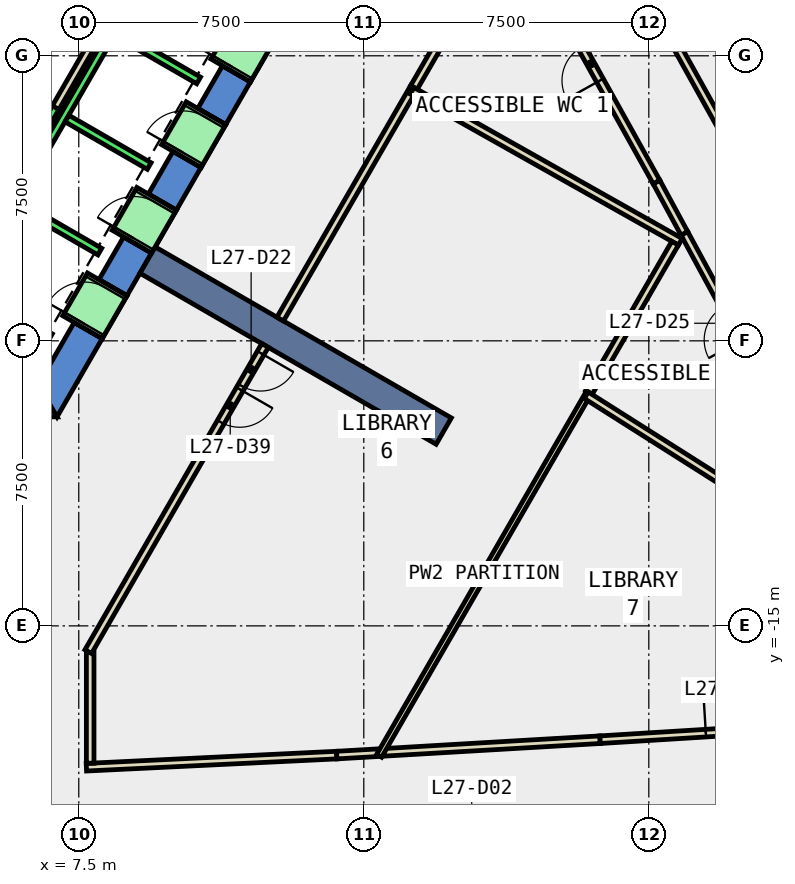
"""IFC4 building model, lengths in metres.
Left out: names, types, materials, properties, quantities, classifications, styles, units other than length and angle.
Written with IfcOpenShell. Run it as: python <this file> out.ifc"""

import sys

from ifc_helpers import new_model, si_unit, direction, frame, frame_2d, origin, place, context, subcontext, project, spatial, polyline, rectangle, outline, extrude, element, fill, save


model = new_model("IFC4")
c1 = context("Model", 3, precision=1e-05, world=origin(), true_north=direction((0.0, 1.0)))
c2 = subcontext(c1, "Body", "Model", "MODEL_VIEW")
j1 = project(units=[si_unit("LENGTHUNIT", "METRE"), si_unit("PLANEANGLEUNIT", "RADIAN")], contexts=[c1])
p1 = place(None, origin())
s1 = spatial("IfcSite", under=j1, at=p1, CompositionType="ELEMENT")
p2 = place(p1, origin())
s2 = spatial("IfcBuilding", under=s1, at=p2, CompositionType="ELEMENT")
p3 = place(p2, frame((0.0, 0.0, 124.4)))
s3 = spatial("IfcBuildingStorey", under=s2, at=p3, CompositionType="ELEMENT", Elevation=124.4)
p4 = place(p3, frame((0.0, 0.0, -0.4)))
e1 = element("IfcWall", 1, at=p4, inside=s3, PredefinedType="SHEAR", context=c2, shape_type="SweptSolid", body=[
    extrude(outline(polyline([(5.75, -8.65), (5.75, -9.5), (6.928, -9.5), (6.437, -8.65), (5.75, -8.65)])), origin(), (0.0, 0.0, 1.0), 4.2),
])
p5 = place(p3, frame((0.0, 0.0, -0.4)))
e2 = element("IfcWall", 2, at=p5, inside=s3, PredefinedType="SHEAR", context=c2, shape_type="SweptSolid", body=[
    extrude(outline(polyline([(8.117, -7.44), (7.381, -7.015), (6.437, -8.65), (6.928, -9.5), (8.117, -7.44)])), origin(), (0.0, 0.0, 1.0), 4.2),
])
p6 = place(p3, frame((0.0, 0.0, -0.4)))
e3 = element("IfcWall", 3, at=p6, inside=s3, PredefinedType="SHEAR", context=c2, shape_type="SweptSolid", body=[
    extrude(outline(polyline([(9.417, -5.189), (8.681, -4.764), (8.031, -5.889), (8.767, -6.314), (9.417, -5.189)])), origin(), (0.0, 0.0, 1.0), 4.2),
])
p7 = place(p3, frame((0.0, 0.0, -0.4)))
e4 = element("IfcWall", 4, at=p7, inside=s3, PredefinedType="SHEAR", context=c2, shape_type="SweptSolid", body=[
    extrude(outline(polyline([(10.717, -2.937), (9.981, -2.512), (9.331, -3.638), (10.067, -4.063), (10.717, -2.937)])), origin(), (0.0, 0.0, 1.0), 4.2),
])
p8 = place(p3, frame((0.0, 0.0, -0.4)))
e5 = element("IfcWall", 5, at=p8, inside=s3, PredefinedType="SHEAR", context=c2, shape_type="SweptSolid", body=[
    extrude(outline(polyline([(12.017, -0.686), (11.281, -0.261), (10.631, -1.386), (11.367, -1.811), (12.017, -0.686)])), origin(), (0.0, 0.0, 1.0), 4.2),
])
p9 = place(p3, frame((0.0, 0.0, 3.6)))
e6 = element("IfcWall", 6, at=p9, inside=s3, PredefinedType="SHEAR", context=c2, shape_type="SweptSolid", body=[
    extrude(outline(polyline([(8.767, -6.314), (8.031, -5.889), (7.381, -7.015), (8.117, -7.44), (8.767, -6.314)])), origin(), (0.0, 0.0, 1.0), 0.2),
])
p10 = place(p3, frame((0.0, 0.0, 3.6)))
e7 = element("IfcWall", 7, at=p10, inside=s3, PredefinedType="SHEAR", context=c2, shape_type="SweptSolid", body=[
    extrude(outline(polyline([(10.067, -4.063), (9.331, -3.638), (8.681, -4.764), (9.417, -5.189), (10.067, -4.063)])), origin(), (0.0, 0.0, 1.0), 0.2),
])
p11 = place(p3, frame((0.0, 0.0, 3.6)))
e8 = element("IfcWall", 8, at=p11, inside=s3, PredefinedType="SHEAR", context=c2, shape_type="SweptSolid", body=[
    extrude(outline(polyline([(11.367, -1.811), (10.631, -1.386), (9.981, -2.512), (10.717, -2.937), (11.367, -1.811)])), origin(), (0.0, 0.0, 1.0), 0.2),
])
p12 = place(p3, frame((0.0, 0.0, 3.6)))
e9 = element("IfcWall", 9, at=p12, inside=s3, PredefinedType="SHEAR", context=c2, shape_type="SweptSolid", body=[
    extrude(outline(polyline([(12.667, 0.44), (11.931, 0.865), (11.281, -0.261), (12.017, -0.686), (12.667, 0.44)])), origin(), (0.0, 0.0, 1.0), 0.2),
])
p13 = place(p3, frame((9.31, -5.375, -0.4), z_axis=(0.0, 0.0, 1.0), x_axis=(0.866017533419, -0.500013631625, 0.0)))
e10 = element("IfcWall", 10, at=p13, inside=s3, PredefinedType="SHEAR", context=c2, shape_type="SweptSolid", body=[
    extrude(rectangle(XDim=9.0, YDim=0.8, at=frame_2d((4.5, 0.0))), origin(), (0.0, 0.0, 1.0), 4.2),
])
p14 = place(p3, frame((7.7, -18.719, 0.0), z_axis=(0.0, 0.0, 1.0), x_axis=(0.998829118209, 0.048377604502, 0.0)))
e11 = element("IfcWall", 11, at=p14, inside=s3, PredefinedType="PARTITIONING", context=c2, shape_type="SweptSolid", body=[
    extrude(rectangle(XDim=6.596, YDim=0.2, at=frame_2d((3.298, 0.0))), origin(), (0.0, 0.0, 1.0), 3.8),
])
p15 = place(p3, frame((14.288, -18.4, 0.0), z_axis=(0.0, 0.0, 1.0), x_axis=(0.998339941676, 0.057596535097, 0.0)))
e12 = element("IfcWall", 12, at=p15, inside=s3, PredefinedType="PARTITIONING", context=c2, shape_type="SweptSolid", body=[
    extrude(rectangle(XDim=1.094, YDim=0.2, at=frame_2d((0.547, 0.0))), origin(), (0.0, 0.0, 1.0), 3.8),
])
p16 = place(p3, frame((23.437, -4.676, 0.0), z_axis=(0.0, 0.0, 1.0), x_axis=(-0.47686467088, 0.878976726465, 0.0)))
e13 = element("IfcWall", 13, at=p16, inside=s3, PredefinedType="PARTITIONING", context=c2, shape_type="SweptSolid", body=[
    extrude(rectangle(XDim=1.542, YDim=0.2, at=frame_2d((0.771, 0.0))), origin(), (0.0, 0.0, 1.0), 3.8),
])
p17 = place(p3, frame((22.702, -3.321, 0.0), z_axis=(0.0, 0.0, 1.0), x_axis=(-0.486304341235, 0.873789498504, 0.0)))
e14 = element("IfcWall", 14, at=p17, inside=s3, PredefinedType="PARTITIONING", context=c2, shape_type="SweptSolid", body=[
    extrude(rectangle(XDim=7.113, YDim=0.2, at=frame_2d((3.556, 0.0))), origin(), (0.0, 0.0, 1.0), 3.8),
])
p18 = place(p17, frame((3.057, 0.0, 0.0)))
e15 = element("IfcOpeningElement", 15, at=p18, cuts=e14, PredefinedType="OPENING", context=c2, shape_type="SweptSolid", body=[
    extrude(rectangle(XDim=1.0, YDim=2.1, at=frame_2d((0.5, 1.05))), frame((0.0, 0.11, 0.0), z_axis=(0.0, -1.0, 0.0), x_axis=(1.0, 0.0, 0.0)), (0.0, 0.0, 1.0), 0.22),
])
p19 = place(p3, frame((15.529, -18.328, 0.0), z_axis=(0.0, 0.0, 1.0), x_axis=(0.998293671523, 0.058393025246, 0.0)))
e16 = element("IfcWall", 16, at=p19, inside=s3, PredefinedType="PARTITIONING", context=c2, shape_type="SweptSolid", body=[
    extrude(rectangle(XDim=5.699, YDim=0.2, at=frame_2d((2.849, 0.0))), origin(), (0.0, 0.0, 1.0), 3.8),
])
p20 = place(p3, frame((21.218, -17.995, 0.0), z_axis=(0.0, 0.0, 1.0), x_axis=(0.998092528214, 0.061735768594, 0.0)))
e17 = element("IfcWall", 17, at=p20, inside=s3, PredefinedType="PARTITIONING", context=c2, shape_type="SweptSolid", body=[
    extrude(rectangle(XDim=6.576, YDim=0.2, at=frame_2d((3.288, 0.0))), origin(), (0.0, 0.0, 1.0), 3.8),
])
p21 = place(p20, frame((2.788, 0.0, 0.0)))
e18 = element("IfcOpeningElement", 18, at=p21, cuts=e17, PredefinedType="OPENING", context=c2, shape_type="SweptSolid", body=[
    extrude(rectangle(XDim=1.0, YDim=2.1, at=frame_2d((0.5, 1.05))), frame((0.0, 0.11, 0.0), z_axis=(0.0, -1.0, 0.0), x_axis=(1.0, 0.0, 0.0)), (0.0, 0.0, 1.0), 0.22),
])
p22 = place(p3, frame((26.095, -9.574, 0.0), z_axis=(0.0, 0.0, 1.0), x_axis=(-0.476963271937, 0.878923226012, 0.0)))
e19 = element("IfcWall", 19, at=p22, inside=s3, PredefinedType="PARTITIONING", context=c2, shape_type="SweptSolid", body=[
    extrude(rectangle(XDim=5.573, YDim=0.2, at=frame_2d((2.786, 0.0))), origin(), (0.0, 0.0, 1.0), 3.8),
])
p23 = place(p22, frame((2.386, 0.0, 0.0)))
e20 = element("IfcOpeningElement", 20, at=p23, cuts=e19, PredefinedType="OPENING", context=c2, shape_type="SweptSolid", body=[
    extrude(rectangle(XDim=1.0, YDim=2.1, at=frame_2d((0.5, 1.05))), frame((0.0, 0.11, 0.0), z_axis=(0.0, -1.0, 0.0), x_axis=(1.0, 0.0, 0.0)), (0.0, 0.0, 1.0), 0.22),
])
p24 = place(p3, frame((21.124, 4.04, 0.0), z_axis=(0.0, 0.0, 1.0), x_axis=(0.486229558972, -0.873831114107, 0.0)))
e21 = element("IfcWall", 21, at=p24, inside=s3, PredefinedType="PARTITIONING", context=c2, shape_type="SweptSolid", body=[
    extrude(rectangle(XDim=7.136, YDim=0.2, at=frame_2d((3.568, 0.0))), origin(), (0.0, 0.0, 1.0), 3.8),
])
p25 = place(p24, frame((3.143, 0.0, 0.0)))
e22 = element("IfcOpeningElement", 22, at=p25, cuts=e21, PredefinedType="OPENING", context=c2, shape_type="SweptSolid", body=[
    extrude(rectangle(XDim=1.0, YDim=2.1, at=frame_2d((0.5, 1.05))), frame((0.0, 0.11, 0.0), z_axis=(0.0, -1.0, 0.0), x_axis=(1.0, 0.0, 0.0)), (0.0, 0.0, 1.0), 0.22),
])
p26 = place(p3, frame((6.826, 0.522, 0.0), z_axis=(0.0, 0.0, 1.0), x_axis=(-0.500016722714, -0.866015748706, 0.0)))
e23 = element("IfcWall", 23, at=p26, inside=s3, PredefinedType="PARTITIONING", context=c2, shape_type="SweptSolid", body=[
    extrude(rectangle(XDim=1.7, YDim=0.2, at=frame_2d((0.85, 0.0))), origin(), (0.0, 0.0, 1.0), 3.8),
])
p27 = place(p3, frame((8.192, 0.888, 0.0), z_axis=(0.0, 0.0, 1.0), x_axis=(-0.499940625693, -0.866059680843, 0.0)))
e24 = element("IfcWall", 24, at=p27, inside=s3, PredefinedType="PARTITIONING", context=c2, shape_type="SweptSolid", body=[
    extrude(rectangle(XDim=2.68, YDim=0.2, at=frame_2d((1.34, 0.0))), origin(), (0.0, 0.0, 1.0), 3.8),
])
p28 = place(p3, frame((7.8, -15.69, 0.0), z_axis=(0.0, 0.0, 1.0), x_axis=(0.0, -1.0, 0.0)))
e25 = element("IfcWall", 25, at=p28, inside=s3, PredefinedType="PARTITIONING", context=c2, shape_type="SweptSolid", body=[
    extrude(rectangle(XDim=2.924, YDim=0.2, at=frame_2d((1.462, 0.0))), origin(), (0.0, 0.0, 1.0), 3.8),
])
p29 = place(p3, frame((16.32, -0.832, 0.0), z_axis=(0.0, 0.0, 1.0), x_axis=(-0.499951642806, -0.866053321023, 0.0)))
e26 = element("IfcWall", 26, at=p29, inside=s3, PredefinedType="PARTITIONING", context=c2, shape_type="SweptSolid", body=[
    extrude(rectangle(XDim=7.039, YDim=0.2, at=frame_2d((3.52, 0.0))), origin(), (0.0, 0.0, 1.0), 3.8),
])
p30 = place(p3, frame((18.91, 3.653, 0.0), z_axis=(0.0, 0.0, 1.0), x_axis=(-0.500052967229, -0.865994820981, 0.0)))
e27 = element("IfcWall", 27, at=p30, inside=s3, PredefinedType="PARTITIONING", context=c2, shape_type="SweptSolid", body=[
    extrude(rectangle(XDim=5.179, YDim=0.2, at=frame_2d((2.59, 0.0))), origin(), (0.0, 0.0, 1.0), 3.8),
])
p31 = place(p3, frame((16.27, -0.919, 0.0), z_axis=(0.0, 0.0, 1.0), x_axis=(0.871308980511, -0.490734816863, 0.0)))
e28 = element("IfcWall", 28, at=p31, inside=s3, PredefinedType="PARTITIONING", context=c2, shape_type="SweptSolid", body=[
    extrude(rectangle(XDim=8.1, YDim=0.2, at=frame_2d((4.05, 0.0))), origin(), (0.0, 0.0, 1.0), 3.8),
])
p32 = place(p3, frame((20.924, -8.858, 0.0), z_axis=(0.0, 0.0, 1.0), x_axis=(-0.499996828157, -0.866027235041, 0.0)))
e29 = element("IfcWall", 29, at=p32, inside=s3, PredefinedType="PARTITIONING", context=c2, shape_type="SweptSolid", body=[
    extrude(rectangle(XDim=11.04, YDim=0.15, at=frame_2d((5.52, 0.0))), origin(), (0.0, 0.0, 1.0), 3.8),
])
p33 = place(p3, frame((23.191, -4.932, 0.0), z_axis=(0.0, 0.0, 1.0), x_axis=(-0.500025458316, -0.86601070492, 0.0)))
e30 = element("IfcWall", 30, at=p33, inside=s3, PredefinedType="PARTITIONING", context=c2, shape_type="SweptSolid", body=[
    extrude(rectangle(XDim=4.533, YDim=0.2, at=frame_2d((2.267, 0.0))), origin(), (0.0, 0.0, 1.0), 3.8),
])
p34 = place(p3, frame((20.853, -8.931, 0.0), z_axis=(0.0, 0.0, 1.0), x_axis=(0.844869091455, -0.534973100542, 0.0)))
e31 = element("IfcWall", 31, at=p34, inside=s3, PredefinedType="PARTITIONING", context=c2, shape_type="SweptSolid", body=[
    extrude(rectangle(XDim=8.825, YDim=0.2, at=frame_2d((4.413, 0.0))), origin(), (0.0, 0.0, 1.0), 3.8),
])
p35 = place(p3, frame((12.401, -7.621, 0.0), z_axis=(0.0, 0.0, 1.0), x_axis=(-0.499983724212, -0.866034800411, 0.0)))
e32 = element("IfcWall", 32, at=p35, inside=s3, PredefinedType="PARTITIONING", context=c2, shape_type="SweptSolid", body=[
    extrude(rectangle(XDim=9.302, YDim=0.2, at=frame_2d((4.651, 0.0))), origin(), (0.0, 0.0, 1.0), 3.8),
])
p36 = place(p35, frame((0.231, 0.0, 0.0)))
e33 = element("IfcOpeningElement", 33, at=p36, cuts=e32, PredefinedType="OPENING", context=c2, shape_type="SweptSolid", body=[
    extrude(rectangle(XDim=1.0, YDim=2.1, at=frame_2d((0.5, 1.05))), frame((0.0, 0.11, 0.0), z_axis=(0.0, -1.0, 0.0), x_axis=(1.0, 0.0, 0.0)), (0.0, 0.0, 1.0), 0.22),
])
p37 = place(p35, frame((1.331, 0.0, 0.0)))
e34 = element("IfcOpeningElement", 34, at=p37, cuts=e32, PredefinedType="OPENING", context=c2, shape_type="SweptSolid", body=[
    extrude(rectangle(XDim=1.0, YDim=2.1, at=frame_2d((0.5, 1.05))), frame((0.0, 0.11, 0.0), z_axis=(0.0, -1.0, 0.0), x_axis=(1.0, 0.0, 0.0)), (0.0, 0.0, 1.0), 0.22),
])
p38 = place(p3, frame((5.492, -3.788, 0.0), z_axis=(0.0, 0.0, 1.0), x_axis=(0.500011755427, 0.866018616679, 0.0)))
e35 = element("IfcWall", 35, at=p38, inside=s3, PredefinedType="STANDARD", context=c2, shape_type="SweptSolid", body=[
    extrude(rectangle(XDim=2.8, YDim=0.2, at=frame_2d((1.4, 0.0))), origin(), (0.0, 0.0, 1.0), 3.8),
])
p39 = place(p3, frame((4.677, -0.2, 0.0), z_axis=(0.0, 0.0, 1.0), x_axis=(0.865973769406, -0.500089422704, 0.0)))
e36 = element("IfcWall", 36, at=p39, inside=s3, PredefinedType="STANDARD", context=c2, shape_type="SweptSolid", body=[
    extrude(rectangle(XDim=2.399, YDim=0.2, at=frame_2d((1.2, 0.0))), origin(), (0.0, 0.0, 1.0), 3.8),
])
p40 = place(p3, frame((4.451, -6.19, 0.0), z_axis=(0.0, 0.0, 1.0), x_axis=(0.50000090737, 0.866024879913, 0.0)))
e37 = element("IfcWall", 37, at=p40, inside=s3, PredefinedType="STANDARD", context=c2, shape_type="SweptSolid", body=[
    extrude(rectangle(XDim=10.6, YDim=0.2, at=frame_2d((5.3, 0.0))), origin(), (0.0, 0.0, 1.0), 3.8),
])
for number, where, z_axis, x_axis in (
    (38, (4.588, -6.153, 0.0), (0.0, 0.0, 1.0), (0.866, -0.5, 0.0)),
    (39, (5.888, -3.902, 0.0), (0.0, 0.0, 1.0), (0.866, -0.5, 0.0)),
    (40, (7.188, -1.65, 0.0), (0.0, 0.0, 1.0), (0.866, -0.5, 0.0)),
    (41, (8.488, 0.602, 0.0), (0.0, 0.0, 1.0), (0.866, -0.5, 0.0)),
):
    element("IfcWall", number, at=place(p3, frame(where, z_axis=z_axis, x_axis=x_axis)), inside=s3, PredefinedType="STANDARD", context=c2, shape_type="SweptSolid", body=[
        extrude(rectangle(XDim=2.5, YDim=0.2, at=frame_2d((1.25, 0.0))), origin(), (0.0, 0.0, 1.0), 3.8),
    ])
p41 = place(p3, frame((7.598, -7.14, 0.0), z_axis=(0.0, 0.0, 1.0), x_axis=(0.500362116554, 0.865816234728, 0.0)))
e42 = element("IfcWall", 42, at=p41, inside=s3, PredefinedType="STANDARD", context=c2, shape_type="SweptSolid", body=[
    extrude(rectangle(XDim=1.299, YDim=1.2, at=frame_2d((0.65, 0.0))), origin(), (0.0, 0.0, 1.0), 2.4),
])
p42 = place(p41, frame((0.1, 0.0, 0.0)))
e43 = element("IfcOpeningElement", 43, at=p42, cuts=e42, PredefinedType="OPENING", context=c2, shape_type="SweptSolid", body=[
    extrude(rectangle(XDim=1.1, YDim=2.3, at=frame_2d((0.55, 1.15))), frame((0.0, 0.61, 0.0), z_axis=(0.0, -1.0, 0.0), x_axis=(1.0, 0.0, 0.0)), (0.0, 0.0, 1.0), 1.22),
])
p43 = place(p3, frame((8.898, -4.889, 0.0), z_axis=(0.0, 0.0, 1.0), x_axis=(0.500036693733, 0.866004217611, 0.0)))
e44 = element("IfcWall", 44, at=p43, inside=s3, PredefinedType="STANDARD", context=c2, shape_type="SweptSolid", body=[
    extrude(rectangle(XDim=1.3, YDim=1.2, at=frame_2d((0.65, 0.0))), origin(), (0.0, 0.0, 1.0), 2.4),
])
p44 = place(p43, frame((0.1, 0.0, 0.0)))
e45 = element("IfcOpeningElement", 45, at=p44, cuts=e44, PredefinedType="OPENING", context=c2, shape_type="SweptSolid", body=[
    extrude(rectangle(XDim=1.1, YDim=2.3, at=frame_2d((0.55, 1.15))), frame((0.0, 0.61, 0.0), z_axis=(0.0, -1.0, 0.0), x_axis=(1.0, 0.0, 0.0)), (0.0, 0.0, 1.0), 1.22),
])
p45 = place(p3, frame((10.198, -2.637, 0.0), z_axis=(0.0, 0.0, 1.0), x_axis=(0.49989585183, 0.866085525409, 0.0)))
e46 = element("IfcWall", 46, at=p45, inside=s3, PredefinedType="STANDARD", context=c2, shape_type="SweptSolid", body=[
    extrude(rectangle(XDim=1.3, YDim=1.2, at=frame_2d((0.65, 0.0))), origin(), (0.0, 0.0, 1.0), 2.4),
])
p46 = place(p45, frame((0.1, 0.0, 0.0)))
e47 = element("IfcOpeningElement", 47, at=p46, cuts=e46, PredefinedType="OPENING", context=c2, shape_type="SweptSolid", body=[
    extrude(rectangle(XDim=1.1, YDim=2.3, at=frame_2d((0.55, 1.15))), frame((0.0, 0.61, 0.0), z_axis=(0.0, -1.0, 0.0), x_axis=(1.0, 0.0, 0.0)), (0.0, 0.0, 1.0), 1.22),
])
p47 = place(p3, frame((11.498, -0.385, 0.0), z_axis=(0.0, 0.0, 1.0), x_axis=(0.500221244143, 0.865897630733, 0.0)))
e48 = element("IfcWall", 48, at=p47, inside=s3, PredefinedType="STANDARD", context=c2, shape_type="SweptSolid", body=[
    extrude(rectangle(XDim=1.299, YDim=1.2, at=frame_2d((0.65, 0.0))), origin(), (0.0, 0.0, 1.0), 2.4),
])
p48 = place(p47, frame((0.1, 0.0, 0.0)))
e49 = element("IfcOpeningElement", 49, at=p48, cuts=e48, PredefinedType="OPENING", context=c2, shape_type="SweptSolid", body=[
    extrude(rectangle(XDim=1.1, YDim=2.3, at=frame_2d((0.55, 1.15))), frame((0.0, 0.61, 0.0), z_axis=(0.0, -1.0, 0.0), x_axis=(1.0, 0.0, 0.0)), (0.0, 0.0, 1.0), 1.22),
])
p49 = place(p36, origin())
e50 = element("IfcDoor", 50, at=p49, inside=s3, OperationType="SINGLE_SWING_LEFT", PredefinedType="DOOR", context=c2, shape_type="SweptSolid", body=[
    extrude(rectangle(XDim=1.0, YDim=2.1, at=frame_2d((0.5, 1.05))), frame((0.0, 0.025, 0.0), z_axis=(0.0, -1.0, 0.0), x_axis=(1.0, 0.0, 0.0)), (0.0, 0.0, 1.0), 0.05),
])
fill(e33, e50)
p50 = place(p18, origin())
e51 = element("IfcDoor", 51, at=p50, inside=s3, OperationType="SINGLE_SWING_LEFT", PredefinedType="DOOR", context=c2, shape_type="SweptSolid", body=[
    extrude(rectangle(XDim=1.0, YDim=2.1, at=frame_2d((0.5, 1.05))), frame((0.0, 0.025, 0.0), z_axis=(0.0, -1.0, 0.0), x_axis=(1.0, 0.0, 0.0)), (0.0, 0.0, 1.0), 0.05),
])
fill(e15, e51)
p51 = place(p21, origin())
e52 = element("IfcDoor", 52, at=p51, inside=s3, OperationType="SINGLE_SWING_LEFT", PredefinedType="DOOR", context=c2, shape_type="SweptSolid", body=[
    extrude(rectangle(XDim=1.0, YDim=2.1, at=frame_2d((0.5, 1.05))), frame((0.0, 0.025, 0.0), z_axis=(0.0, -1.0, 0.0), x_axis=(1.0, 0.0, 0.0)), (0.0, 0.0, 1.0), 0.05),
])
fill(e18, e52)
p52 = place(p37, origin())
e53 = element("IfcDoor", 53, at=p52, inside=s3, OperationType="SINGLE_SWING_RIGHT", PredefinedType="DOOR", context=c2, shape_type="SweptSolid", body=[
    extrude(rectangle(XDim=1.0, YDim=2.1, at=frame_2d((0.5, 1.05))), frame((0.0, 0.025, 0.0), z_axis=(0.0, -1.0, 0.0), x_axis=(1.0, 0.0, 0.0)), (0.0, 0.0, 1.0), 0.05),
])
fill(e34, e53)
p53 = place(p42, origin())
e54 = element("IfcDoor", 54, at=p53, inside=s3, OperationType="SLIDING_TO_LEFT", PredefinedType="DOOR", context=c2, shape_type="SweptSolid", body=[
    extrude(rectangle(XDim=1.1, YDim=2.3, at=frame_2d((0.55, 1.15))), frame((0.0, 0.025, 0.0), z_axis=(0.0, -1.0, 0.0), x_axis=(1.0, 0.0, 0.0)), (0.0, 0.0, 1.0), 0.05),
])
fill(e43, e54)
p54 = place(p44, origin())
e55 = element("IfcDoor", 55, at=p54, inside=s3, OperationType="SLIDING_TO_LEFT", PredefinedType="DOOR", context=c2, shape_type="SweptSolid", body=[
    extrude(rectangle(XDim=1.1, YDim=2.3, at=frame_2d((0.55, 1.15))), frame((0.0, 0.025, 0.0), z_axis=(0.0, -1.0, 0.0), x_axis=(1.0, 0.0, 0.0)), (0.0, 0.0, 1.0), 0.05),
])
fill(e45, e55)
p55 = place(p46, origin())
e56 = element("IfcDoor", 56, at=p55, inside=s3, OperationType="SLIDING_TO_LEFT", PredefinedType="DOOR", context=c2, shape_type="SweptSolid", body=[
    extrude(rectangle(XDim=1.1, YDim=2.3, at=frame_2d((0.55, 1.15))), frame((0.0, 0.025, 0.0), z_axis=(0.0, -1.0, 0.0), x_axis=(1.0, 0.0, 0.0)), (0.0, 0.0, 1.0), 0.05),
])
fill(e47, e56)
p56 = place(p48, origin())
e57 = element("IfcDoor", 57, at=p56, inside=s3, OperationType="SLIDING_TO_LEFT", PredefinedType="DOOR", context=c2, shape_type="SweptSolid", body=[
    extrude(rectangle(XDim=1.1, YDim=2.3, at=frame_2d((0.55, 1.15))), frame((0.0, 0.025, 0.0), z_axis=(0.0, -1.0, 0.0), x_axis=(1.0, 0.0, 0.0)), (0.0, 0.0, 1.0), 0.05),
])
fill(e49, e57)
save(model, sys.argv[1])
